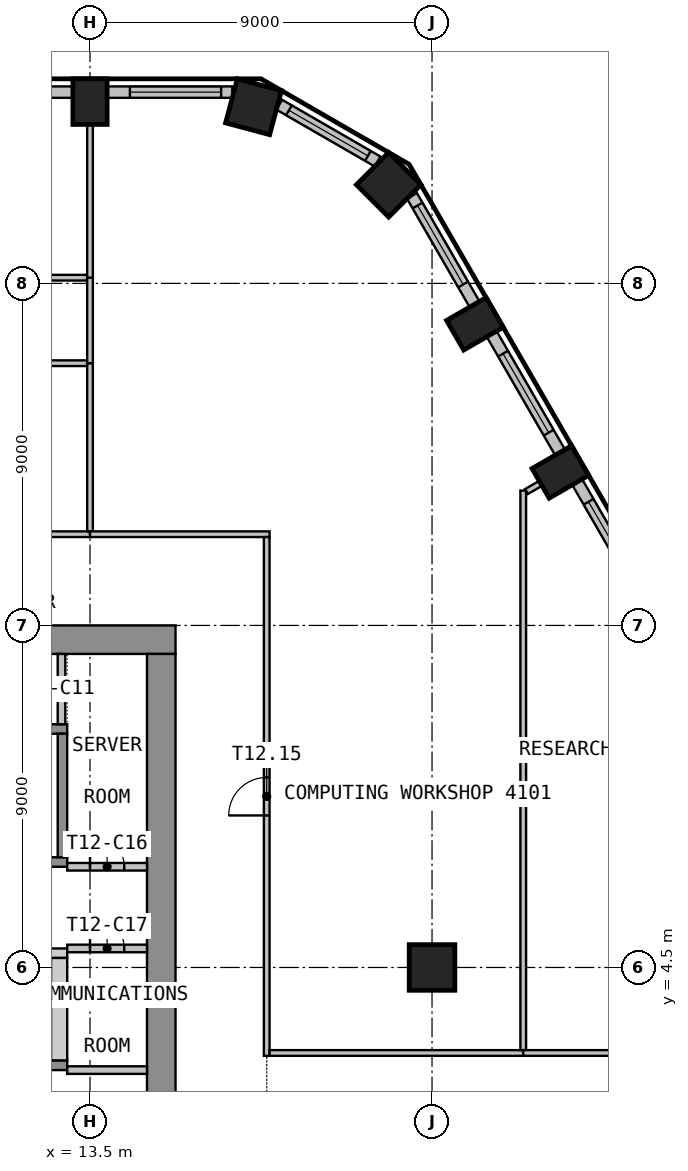
"""IFC4 building model, lengths in metres.
Left out: names, types, materials, properties, quantities, classifications, styles, units other than length and angle.
Written with IfcOpenShell. Run it as: python <this file> out.ifc"""

import sys

from ifc_helpers import new_model, si_unit, direction, frame, frame_2d, origin, origin_2d, place, context, subcontext, project, spatial, polyline, rectangle, circle, outline, extrude, element, fill, save


model = new_model("IFC4")
c1 = context("Model", 3, precision=1e-05, world=origin(), true_north=direction((0.0, 1.0)))
c2 = subcontext(c1, "Body", "Model", "MODEL_VIEW")
j1 = project(units=[si_unit("LENGTHUNIT", "METRE"), si_unit("PLANEANGLEUNIT", "RADIAN")], contexts=[c1])
p1 = place(None, origin())
s1 = spatial("IfcSite", under=j1, at=p1, CompositionType="ELEMENT")
p2 = place(p1, origin())
s2 = spatial("IfcBuilding", under=s1, at=p2, CompositionType="ELEMENT")
p3 = place(p2, frame((0.0, 0.0, 167.7)))
s3 = spatial("IfcBuildingStorey", under=s2, at=p3, CompositionType="ELEMENT", Elevation=167.7)
for number, where, z_axis, x_axis in (
    (1, (25.877, 17.539, 0.0), (0.0, 0.0, 1.0), (-0.5, 0.866, 0.0)),
    (2, (23.627, 21.436, 0.0), (0.0, 0.0, 1.0), (-0.5, 0.866, 0.0)),
):
    element("IfcColumn", number, at=place(p3, frame(where, z_axis=z_axis, x_axis=x_axis)), inside=s3, PredefinedType="COLUMN", context=c2, shape_type="SweptSolid", body=[
        extrude(rectangle(XDim=0.9, YDim=1.2, at=origin_2d()), origin(), (0.0, 0.0, 1.0), 3.575),
    ])
for number, where, z_axis, x_axis in (
    (3, (21.359, 25.095, 0.0), (0.0, 0.0, 1.0), (-0.707, 0.707, 0.0)),
    (4, (17.803, 27.148, 0.0), (0.0, 0.0, 1.0), (-0.966, 0.259, 0.0)),
):
    element("IfcColumn", number, at=place(p3, frame(where, z_axis=z_axis, x_axis=x_axis)), inside=s3, PredefinedType="COLUMN", context=c2, shape_type="SweptSolid", body=[
        extrude(rectangle(XDim=1.2, YDim=1.2, at=origin_2d()), origin(), (0.0, 0.0, 1.0), 3.575),
    ])
p4 = place(p3, frame((13.5, 27.283, 0.0), z_axis=(0.0, 0.0, 1.0), x_axis=(-1.0, 0.0, 0.0)))
e5 = element("IfcColumn", 5, at=p4, inside=s3, PredefinedType="COLUMN", context=c2, shape_type="SweptSolid", body=[
    extrude(rectangle(XDim=0.9, YDim=1.2, at=origin_2d()), origin(), (0.0, 0.0, 1.0), 3.575),
])
p5 = place(p3, frame((22.5, 4.5, 0.0), z_axis=(0.0, 0.0, 1.0), x_axis=(1.0, 0.0, 0.0)))
e6 = element("IfcColumn", 6, at=p5, inside=s3, PredefinedType="COLUMN", context=c2, shape_type="SweptSolid", body=[
    extrude(circle(Radius=0.6, at=origin_2d()), origin(), (0.0, 0.0, 1.0), 3.575),
])
p6 = place(p3, frame((28.119, 14.156, 0.0), z_axis=(0.0, 0.0, 1.0), x_axis=(-0.500027802648, 0.866009351323, 0.0)))
e7 = element("IfcWall", 7, at=p6, inside=s3, PredefinedType="SOLIDWALL", context=c2, shape_type="SweptSolid", body=[
    extrude(rectangle(XDim=3.599, YDim=0.3, at=frame_2d((1.799, 0.0))), origin(), (0.0, 0.0, 1.0), 3.575),
])
p7 = place(p6, frame((0.6, 0.0, 0.9)))
e8 = element("IfcOpeningElement", 8, at=p7, cuts=e7, PredefinedType="OPENING", context=c2, shape_type="SweptSolid", body=[
    extrude(rectangle(XDim=2.4, YDim=2.1, at=frame_2d((1.2, 1.05))), frame((0.0, 0.16, 0.0), z_axis=(0.0, -1.0, 0.0), x_axis=(1.0, 0.0, 0.0)), (0.0, 0.0, 1.0), 0.32),
])
p8 = place(p3, frame((25.869, 18.054, 0.0), z_axis=(0.0, 0.0, 1.0), x_axis=(-0.500027802648, 0.866009351323, 0.0)))
e9 = element("IfcWall", 9, at=p8, inside=s3, PredefinedType="SOLIDWALL", context=c2, shape_type="SweptSolid", body=[
    extrude(rectangle(XDim=3.599, YDim=0.3, at=frame_2d((1.799, 0.0))), origin(), (0.0, 0.0, 1.0), 3.575),
])
p9 = place(p8, frame((0.6, 0.0, 0.9)))
e10 = element("IfcOpeningElement", 10, at=p9, cuts=e9, PredefinedType="OPENING", context=c2, shape_type="SweptSolid", body=[
    extrude(rectangle(XDim=2.4, YDim=2.1, at=frame_2d((1.2, 1.05))), frame((0.0, 0.16, 0.0), z_axis=(0.0, -1.0, 0.0), x_axis=(1.0, 0.0, 0.0)), (0.0, 0.0, 1.0), 0.32),
])
p10 = place(p3, frame((23.619, 21.951, 0.0), z_axis=(0.0, 0.0, 1.0), x_axis=(-0.500036802197, 0.866004154983, 0.0)))
e11 = element("IfcWall", 11, at=p10, inside=s3, PredefinedType="SOLIDWALL", context=c2, shape_type="SweptSolid", body=[
    extrude(rectangle(XDim=3.294, YDim=0.3, at=frame_2d((1.647, 0.0))), origin(), (0.0, 0.0, 1.0), 3.575),
])
p11 = place(p10, frame((0.6, 0.0, 0.9)))
e12 = element("IfcOpeningElement", 12, at=p11, cuts=e11, PredefinedType="OPENING", context=c2, shape_type="SweptSolid", body=[
    extrude(rectangle(XDim=2.4, YDim=2.1, at=frame_2d((1.2, 1.05))), frame((0.0, 0.16, 0.0), z_axis=(0.0, -1.0, 0.0), x_axis=(1.0, 0.0, 0.0)), (0.0, 0.0, 1.0), 0.32),
])
p12 = place(p3, frame((21.068, 25.707, 0.0), z_axis=(0.0, 0.0, 1.0), x_axis=(-0.866012844897, 0.500021752, 0.0)))
e13 = element("IfcWall", 13, at=p12, inside=s3, PredefinedType="SOLIDWALL", context=c2, shape_type="SweptSolid", body=[
    extrude(rectangle(XDim=2.989, YDim=0.3, at=frame_2d((1.495, 0.0))), origin(), (0.0, 0.0, 1.0), 3.575),
])
p13 = place(p12, frame((0.295, 0.0, 0.9)))
e14 = element("IfcOpeningElement", 14, at=p13, cuts=e13, PredefinedType="OPENING", context=c2, shape_type="SweptSolid", body=[
    extrude(rectangle(XDim=2.4, YDim=2.1, at=frame_2d((1.2, 1.05))), frame((0.0, 0.16, 0.0), z_axis=(0.0, -1.0, 0.0), x_axis=(1.0, 0.0, 0.0)), (0.0, 0.0, 1.0), 0.32),
])
p14 = place(p3, frame((17.245, 27.533, 0.0), z_axis=(0.0, 0.0, 1.0), x_axis=(-1.0, 0.0, 0.0)))
e15 = element("IfcWall", 15, at=p14, inside=s3, PredefinedType="SOLIDWALL", context=c2, shape_type="SweptSolid", body=[
    extrude(rectangle(XDim=3.294, YDim=0.3, at=frame_2d((1.647, 0.0))), origin(), (0.0, 0.0, 1.0), 3.575),
])
p15 = place(p14, frame((0.295, 0.0, 0.9)))
e16 = element("IfcOpeningElement", 16, at=p15, cuts=e15, PredefinedType="OPENING", context=c2, shape_type="SweptSolid", body=[
    extrude(rectangle(XDim=2.4, YDim=2.1, at=frame_2d((1.2, 1.05))), frame((0.0, 0.16, 0.0), z_axis=(0.0, -1.0, 0.0), x_axis=(1.0, 0.0, 0.0)), (0.0, 0.0, 1.0), 0.32),
])
p16 = place(p3, frame((13.05, 27.533, 0.0), z_axis=(0.0, 0.0, 1.0), x_axis=(-1.0, 0.0, 0.0)))
e17 = element("IfcWall", 17, at=p16, inside=s3, PredefinedType="SOLIDWALL", context=c2, shape_type="SweptSolid", body=[
    extrude(rectangle(XDim=3.599, YDim=0.3, at=frame_2d((1.8, 0.0))), origin(), (0.0, 0.0, 1.0), 3.575),
])
p17 = place(p16, frame((0.6, 0.0, 0.9)))
e18 = element("IfcOpeningElement", 18, at=p17, cuts=e17, PredefinedType="OPENING", context=c2, shape_type="SweptSolid", body=[
    extrude(rectangle(XDim=2.4, YDim=2.1, at=frame_2d((1.2, 1.05))), frame((0.0, 0.16, 0.0), z_axis=(0.0, -1.0, 0.0), x_axis=(1.0, 0.0, 0.0)), (0.0, 0.0, 1.0), 0.32),
])
p18 = place(p3, frame((-15.75, 13.125, 0.0), z_axis=(0.0, 0.0, 1.0), x_axis=(1.0, 0.0, 0.0)))
e19 = element("IfcWall", 19, at=p18, inside=s3, PredefinedType="SHEAR", context=c2, shape_type="SweptSolid", body=[
    extrude(rectangle(XDim=31.5, YDim=0.75, at=frame_2d((15.75, 0.0))), origin(), (0.0, 0.0, 1.0), 3.575),
])
p19 = place(p18, frame((14.55, 0.0, 0.0)))
e20 = element("IfcOpeningElement", 20, at=p19, cuts=e19, PredefinedType="OPENING", context=c2, shape_type="SweptSolid", body=[
    extrude(rectangle(XDim=2.4, YDim=2.1, at=frame_2d((1.2, 1.05))), frame((0.0, 0.385, 0.0), z_axis=(0.0, -1.0, 0.0), x_axis=(1.0, 0.0, 0.0)), (0.0, 0.0, 1.0), 0.77),
])
p20 = place(p18, frame((3.3, 0.0, 0.0)))
e21 = element("IfcOpeningElement", 21, at=p20, cuts=e19, PredefinedType="OPENING", context=c2, shape_type="SweptSolid", body=[
    extrude(rectangle(XDim=1.2, YDim=2.1, at=frame_2d((0.6, 1.05))), frame((0.0, 0.385, 0.0), z_axis=(0.0, -1.0, 0.0), x_axis=(1.0, 0.0, 0.0)), (0.0, 0.0, 1.0), 0.77),
])
p21 = place(p18, frame((27.0, 0.0, 0.0)))
e22 = element("IfcOpeningElement", 22, at=p21, cuts=e19, PredefinedType="OPENING", context=c2, shape_type="SweptSolid", body=[
    extrude(rectangle(XDim=1.2, YDim=2.1, at=frame_2d((0.6, 1.05))), frame((0.0, 0.385, 0.0), z_axis=(0.0, -1.0, 0.0), x_axis=(1.0, 0.0, 0.0)), (0.0, 0.0, 1.0), 0.77),
])
p22 = place(p3, frame((15.375, -12.75, 0.0), z_axis=(0.0, 0.0, 1.0), x_axis=(0.0, 1.0, 0.0)))
e23 = element("IfcWall", 23, at=p22, inside=s3, PredefinedType="SHEAR", context=c2, shape_type="SweptSolid", body=[
    extrude(rectangle(XDim=25.5, YDim=0.75, at=frame_2d((12.75, 0.0))), origin(), (0.0, 0.0, 1.0), 3.575),
])
p23 = place(p22, frame((11.55, 0.0, 0.0)))
e24 = element("IfcOpeningElement", 24, at=p23, cuts=e23, PredefinedType="OPENING", context=c2, shape_type="SweptSolid", body=[
    extrude(rectangle(XDim=2.4, YDim=2.1, at=frame_2d((1.2, 1.05))), frame((0.0, 0.385, 0.0), z_axis=(0.0, -1.0, 0.0), x_axis=(1.0, 0.0, 0.0)), (0.0, 0.0, 1.0), 0.77),
])
p24 = place(p3, origin())
e25 = element("IfcWall", 25, at=p24, inside=s3, PredefinedType="SHEAR", context=c2, shape_type="SweptSolid", body=[
    extrude(outline(polyline([(4.075, 4.75), (12.9, 4.75), (12.9, 5.0), (4.075, 5.0), (4.075, 4.75)])), origin(), (0.0, 0.0, 1.0), 3.575),
])
p25 = place(p3, origin())
e26 = element("IfcWall", 26, at=p25, inside=s3, PredefinedType="SHEAR", context=c2, shape_type="SweptSolid", body=[
    extrude(outline(polyline([(12.475, 2.05), (12.9, 2.05), (12.9, 4.75), (12.475, 4.75), (12.475, 2.05)])), origin(), (0.0, 0.0, 1.0), 3.575),
])
p26 = place(p3, frame((9.675, 1.925, 0.0), z_axis=(0.0, 0.0, 1.0), x_axis=(1.0, 0.0, 0.0)))
e27 = element("IfcWall", 27, at=p26, inside=s3, PredefinedType="SHEAR", context=c2, shape_type="SweptSolid", body=[
    extrude(rectangle(XDim=3.225, YDim=0.25, at=frame_2d((1.612, 0.0))), origin(), (0.0, 0.0, 1.0), 3.575),
])
p27 = place(p26, frame((0.925, 0.0, 0.0)))
e28 = element("IfcOpeningElement", 28, at=p27, cuts=e27, PredefinedType="OPENING", context=c2, shape_type="SweptSolid", body=[
    extrude(rectangle(XDim=1.2, YDim=2.1, at=frame_2d((0.6, 1.05))), frame((0.0, 0.135, 0.0), z_axis=(0.0, -1.0, 0.0), x_axis=(1.0, 0.0, 0.0)), (0.0, 0.0, 1.0), 0.27),
])
p28 = place(p3, frame((2.8, 7.275, 0.0), z_axis=(0.0, 0.0, 1.0), x_axis=(1.0, 0.0, 0.0)))
e29 = element("IfcWall", 29, at=p28, inside=s3, PredefinedType="SHEAR", context=c2, shape_type="SweptSolid", body=[
    extrude(rectangle(XDim=10.1, YDim=0.25, at=frame_2d((5.05, 0.0))), origin(), (0.0, 0.0, 1.0), 3.575),
])
p29 = place(p28, frame((8.45, 0.0, 0.0)))
e30 = element("IfcOpeningElement", 30, at=p29, cuts=e29, PredefinedType="OPENING", context=c2, shape_type="SweptSolid", body=[
    extrude(rectangle(XDim=1.2, YDim=2.1, at=frame_2d((0.6, 1.05))), frame((0.0, 0.135, 0.0), z_axis=(0.0, -1.0, 0.0), x_axis=(1.0, 0.0, 0.0)), (0.0, 0.0, 1.0), 0.27),
])
p30 = place(p3, frame((2.8, 10.775, 0.0), z_axis=(0.0, 0.0, 1.0), x_axis=(1.0, 0.0, 0.0)))
e31 = element("IfcWall", 31, at=p30, inside=s3, PredefinedType="SHEAR", context=c2, shape_type="SweptSolid", body=[
    extrude(rectangle(XDim=10.1, YDim=0.25, at=frame_2d((5.05, 0.0))), origin(), (0.0, 0.0, 1.0), 3.575),
])
p31 = place(p30, frame((8.45, 0.0, 0.0)))
e32 = element("IfcOpeningElement", 32, at=p31, cuts=e31, PredefinedType="OPENING", context=c2, shape_type="SweptSolid", body=[
    extrude(rectangle(XDim=1.2, YDim=2.1, at=frame_2d((0.6, 1.05))), frame((0.0, 0.135, 0.0), z_axis=(0.0, -1.0, 0.0), x_axis=(1.0, 0.0, 0.0)), (0.0, 0.0, 1.0), 0.27),
])
p32 = place(p3, frame((12.775, 7.4, 0.0), z_axis=(0.0, 0.0, 1.0), x_axis=(0.0, 1.0, 0.0)))
e33 = element("IfcWall", 33, at=p32, inside=s3, PredefinedType="SHEAR", context=c2, shape_type="SweptSolid", body=[
    extrude(rectangle(XDim=3.25, YDim=0.25, at=frame_2d((1.625, 0.0))), origin(), (0.0, 0.0, 1.0), 3.575),
])
p33 = place(p3, frame((12.75, 10.9, 0.0), z_axis=(0.0, 0.0, 1.0), x_axis=(0.0, 1.0, 0.0)))
e34 = element("IfcWall", 34, at=p33, inside=s3, PredefinedType="PARTITIONING", context=c2, shape_type="SweptSolid", body=[
    extrude(rectangle(XDim=1.85, YDim=0.2, at=frame_2d((0.925, 0.0))), origin(), (0.0, 0.0, 1.0), 3.575),
])
p34 = place(p3, frame((12.9, 7.15, 0.0), z_axis=(0.0, 0.0, 1.0), x_axis=(1.0, 0.0, 0.0)))
e35 = element("IfcWall", 35, at=p34, inside=s3, PredefinedType="PARTITIONING", context=c2, shape_type="SweptSolid", body=[
    extrude(rectangle(XDim=2.1, YDim=0.2, at=frame_2d((1.05, 0.0))), origin(), (0.0, 0.0, 1.0), 3.575),
])
p35 = place(p34, frame((0.6, 0.0, 0.0)))
e36 = element("IfcOpeningElement", 36, at=p35, cuts=e35, PredefinedType="OPENING", context=c2, shape_type="SweptSolid", body=[
    extrude(rectangle(XDim=0.9, YDim=2.1, at=frame_2d((0.45, 1.05))), frame((0.0, 0.11, 0.0), z_axis=(0.0, -1.0, 0.0), x_axis=(1.0, 0.0, 0.0)), (0.0, 0.0, 1.0), 0.22),
])
p36 = place(p3, frame((12.9, 5.0, 0.0), z_axis=(0.0, 0.0, 1.0), x_axis=(1.0, 0.0, 0.0)))
e37 = element("IfcWall", 37, at=p36, inside=s3, PredefinedType="PARTITIONING", context=c2, shape_type="SweptSolid", body=[
    extrude(rectangle(XDim=2.1, YDim=0.2, at=frame_2d((1.05, 0.0))), origin(), (0.0, 0.0, 1.0), 3.575),
])
p37 = place(p36, frame((0.6, 0.0, 0.0)))
e38 = element("IfcOpeningElement", 38, at=p37, cuts=e37, PredefinedType="OPENING", context=c2, shape_type="SweptSolid", body=[
    extrude(rectangle(XDim=0.9, YDim=2.1, at=frame_2d((0.45, 1.05))), frame((0.0, 0.11, 0.0), z_axis=(0.0, -1.0, 0.0), x_axis=(1.0, 0.0, 0.0)), (0.0, 0.0, 1.0), 0.22),
])
p38 = place(p3, frame((12.9, 1.8, 0.0), z_axis=(0.0, 0.0, 1.0), x_axis=(1.0, 0.0, 0.0)))
e39 = element("IfcWall", 39, at=p38, inside=s3, PredefinedType="PARTITIONING", context=c2, shape_type="SweptSolid", body=[
    extrude(rectangle(XDim=2.1, YDim=0.2, at=frame_2d((1.05, 0.0))), origin(), (0.0, 0.0, 1.0), 3.575),
])
p39 = place(p3, frame((13.5, 15.9, 0.0), z_axis=(0.0, 0.0, 1.0), x_axis=(-1.0, 0.0, 0.0)))
e40 = element("IfcWall", 40, at=p39, inside=s3, PredefinedType="PARTITIONING", context=c2, shape_type="SweptSolid", body=[
    extrude(rectangle(XDim=8.925, YDim=0.15, at=frame_2d((4.462, 0.0))), origin(), (0.0, 0.0, 1.0), 3.575),
])
p40 = place(p39, frame((3.962, 0.0, 0.0)))
e41 = element("IfcOpeningElement", 41, at=p40, cuts=e40, PredefinedType="OPENING", context=c2, shape_type="SweptSolid", body=[
    extrude(rectangle(XDim=1.0, YDim=2.1, at=frame_2d((0.5, 1.05))), frame((0.0, 0.085, 0.0), z_axis=(0.0, -1.0, 0.0), x_axis=(1.0, 0.0, 0.0)), (0.0, 0.0, 1.0), 0.17),
])
for number, where, z_axis, x_axis in (
    (42, (4.575, 20.4, 0.0), (0.0, 0.0, 1.0), (1.0, 0.0, 0.0)),
    (43, (4.575, 22.65, 0.0), (0.0, 0.0, 1.0), (1.0, 0.0, 0.0)),
):
    element("IfcWall", number, at=place(p3, frame(where, z_axis=z_axis, x_axis=x_axis)), inside=s3, PredefinedType="PARTITIONING", context=c2, shape_type="SweptSolid", body=[
        extrude(rectangle(XDim=8.85, YDim=0.15, at=frame_2d((4.425, 0.0))), origin(), (0.0, 0.0, 1.0), 3.575),
    ])
p41 = place(p3, frame((13.5, 20.4, 0.0), z_axis=(0.0, 0.0, 1.0), x_axis=(0.0, -1.0, 0.0)))
e44 = element("IfcWall", 44, at=p41, inside=s3, PredefinedType="PARTITIONING", context=c2, shape_type="SweptSolid", body=[
    extrude(rectangle(XDim=4.425, YDim=0.15, at=frame_2d((2.212, 0.0))), origin(), (0.0, 0.0, 1.0), 3.575),
])
p42 = place(p3, frame((18.225, 15.9, 0.0), z_axis=(0.0, 0.0, 1.0), x_axis=(-1.0, 0.0, 0.0)))
e45 = element("IfcWall", 45, at=p42, inside=s3, PredefinedType="PARTITIONING", context=c2, shape_type="SweptSolid", body=[
    extrude(rectangle(XDim=4.725, YDim=0.15, at=frame_2d((2.363, 0.0))), origin(), (0.0, 0.0, 1.0), 3.575),
])
p43 = place(p3, frame((13.5, 22.65, 0.0), z_axis=(0.0, 0.0, 1.0), x_axis=(0.0, -1.0, 0.0)))
e46 = element("IfcWall", 46, at=p43, inside=s3, PredefinedType="PARTITIONING", context=c2, shape_type="SweptSolid", body=[
    extrude(rectangle(XDim=2.25, YDim=0.15, at=frame_2d((1.125, 0.0))), origin(), (0.0, 0.0, 1.0), 3.575),
])
p44 = place(p3, frame((13.5, 26.663, 0.0), z_axis=(0.0, 0.0, 1.0), x_axis=(0.0, -1.0, 0.0)))
e47 = element("IfcWall", 47, at=p44, inside=s3, PredefinedType="PARTITIONING", context=c2, shape_type="SweptSolid", body=[
    extrude(rectangle(XDim=4.013, YDim=0.15, at=frame_2d((2.006, 0.0))), origin(), (0.0, 0.0, 1.0), 3.575),
])
p45 = place(p3, frame((18.15, 2.175, 0.0), z_axis=(0.0, 0.0, 1.0), x_axis=(0.0, 1.0, 0.0)))
e48 = element("IfcWall", 48, at=p45, inside=s3, PredefinedType="PARTITIONING", context=c2, shape_type="SweptSolid", body=[
    extrude(rectangle(XDim=13.65, YDim=0.15, at=frame_2d((6.825, 0.0))), origin(), (0.0, 0.0, 1.0), 3.575),
])
p46 = place(p45, frame((6.325, 0.0, 0.0)))
e49 = element("IfcOpeningElement", 49, at=p46, cuts=e48, PredefinedType="OPENING", context=c2, shape_type="SweptSolid", body=[
    extrude(rectangle(XDim=1.0, YDim=2.1, at=frame_2d((0.5, 1.05))), frame((0.0, 0.085, 0.0), z_axis=(0.0, -1.0, 0.0), x_axis=(1.0, 0.0, 0.0)), (0.0, 0.0, 1.0), 0.17),
])
p47 = place(p3, frame((18.225, 2.25, 0.0), z_axis=(0.0, 0.0, 1.0), x_axis=(1.0, 0.0, 0.0)))
e50 = element("IfcWall", 50, at=p47, inside=s3, PredefinedType="PARTITIONING", context=c2, shape_type="SweptSolid", body=[
    extrude(rectangle(XDim=6.675, YDim=0.15, at=frame_2d((3.337, 0.0))), origin(), (0.0, 0.0, 1.0), 3.575),
])
p48 = place(p3, frame((24.9, 17.049, 0.0), z_axis=(0.0, 0.0, 1.0), x_axis=(0.0, -1.0, 0.0)))
e51 = element("IfcWall", 51, at=p48, inside=s3, PredefinedType="PARTITIONING", context=c2, shape_type="SweptSolid", body=[
    extrude(rectangle(XDim=14.724, YDim=0.15, at=frame_2d((7.362, 0.0))), origin(), (0.0, 0.0, 1.0), 3.575),
])
p49 = place(p3, frame((24.9, 2.25, 0.0), z_axis=(0.0, 0.0, 1.0), x_axis=(1.0, 0.0, 0.0)))
e52 = element("IfcWall", 52, at=p49, inside=s3, PredefinedType="PARTITIONING", context=c2, shape_type="SweptSolid", body=[
    extrude(rectangle(XDim=9.068, YDim=0.15, at=frame_2d((4.534, 0.0))), origin(), (0.0, 0.0, 1.0), 3.575),
])
p50 = place(p49, frame((4.034, 0.0, 0.0)))
e53 = element("IfcOpeningElement", 53, at=p50, cuts=e52, PredefinedType="OPENING", context=c2, shape_type="SweptSolid", body=[
    extrude(rectangle(XDim=1.0, YDim=2.1, at=frame_2d((0.5, 1.05))), frame((0.0, 0.085, 0.0), z_axis=(0.0, -1.0, 0.0), x_axis=(1.0, 0.0, 0.0)), (0.0, 0.0, 1.0), 0.17),
])
p51 = place(p3, frame((25.341, 17.228, 0.0), z_axis=(0.0, 0.0, 1.0), x_axis=(-0.866066236526, -0.499929268946, 0.0)))
e54 = element("IfcWall", 54, at=p51, inside=s3, PredefinedType="PARTITIONING", context=c2, shape_type="SweptSolid", body=[
    extrude(rectangle(XDim=0.409, YDim=0.15, at=frame_2d((0.204, 0.0))), origin(), (0.0, 0.0, 1.0), 3.575),
])
p52 = place(p7, origin())
e55 = element("IfcWindow", 55, at=p52, inside=s3, PartitioningType="SINGLE_PANEL", PredefinedType="WINDOW", context=c2, shape_type="SweptSolid", body=[
    extrude(rectangle(XDim=2.4, YDim=2.1, at=frame_2d((1.2, 1.05))), frame((0.0, 0.03, 0.0), z_axis=(0.0, -1.0, 0.0), x_axis=(1.0, 0.0, 0.0)), (0.0, 0.0, 1.0), 0.06),
])
fill(e8, e55)
p53 = place(p9, origin())
e56 = element("IfcWindow", 56, at=p53, inside=s3, PartitioningType="SINGLE_PANEL", PredefinedType="WINDOW", context=c2, shape_type="SweptSolid", body=[
    extrude(rectangle(XDim=2.4, YDim=2.1, at=frame_2d((1.2, 1.05))), frame((0.0, 0.03, 0.0), z_axis=(0.0, -1.0, 0.0), x_axis=(1.0, 0.0, 0.0)), (0.0, 0.0, 1.0), 0.06),
])
fill(e10, e56)
p54 = place(p11, origin())
e57 = element("IfcWindow", 57, at=p54, inside=s3, PartitioningType="SINGLE_PANEL", PredefinedType="WINDOW", context=c2, shape_type="SweptSolid", body=[
    extrude(rectangle(XDim=2.4, YDim=2.1, at=frame_2d((1.2, 1.05))), frame((0.0, 0.03, 0.0), z_axis=(0.0, -1.0, 0.0), x_axis=(1.0, 0.0, 0.0)), (0.0, 0.0, 1.0), 0.06),
])
fill(e12, e57)
p55 = place(p13, origin())
e58 = element("IfcWindow", 58, at=p55, inside=s3, PartitioningType="SINGLE_PANEL", PredefinedType="WINDOW", context=c2, shape_type="SweptSolid", body=[
    extrude(rectangle(XDim=2.4, YDim=2.1, at=frame_2d((1.2, 1.05))), frame((0.0, 0.03, 0.0), z_axis=(0.0, -1.0, 0.0), x_axis=(1.0, 0.0, 0.0)), (0.0, 0.0, 1.0), 0.06),
])
fill(e14, e58)
p56 = place(p15, origin())
e59 = element("IfcWindow", 59, at=p56, inside=s3, PartitioningType="SINGLE_PANEL", PredefinedType="WINDOW", context=c2, shape_type="SweptSolid", body=[
    extrude(rectangle(XDim=2.4, YDim=2.1, at=frame_2d((1.2, 1.05))), frame((0.0, 0.03, 0.0), z_axis=(0.0, -1.0, 0.0), x_axis=(1.0, 0.0, 0.0)), (0.0, 0.0, 1.0), 0.06),
])
fill(e16, e59)
p57 = place(p35, origin())
e60 = element("IfcDoor", 60, at=p57, inside=s3, OperationType="SINGLE_SWING_LEFT", PredefinedType="DOOR", context=c2, shape_type="SweptSolid", body=[
    extrude(rectangle(XDim=0.9, YDim=2.1, at=frame_2d((0.45, 1.05))), frame((0.0, 0.025, 0.0), z_axis=(0.0, -1.0, 0.0), x_axis=(1.0, 0.0, 0.0)), (0.0, 0.0, 1.0), 0.05),
])
fill(e36, e60)
p58 = place(p37, origin())
e61 = element("IfcDoor", 61, at=p58, inside=s3, OperationType="SINGLE_SWING_LEFT", PredefinedType="DOOR", context=c2, shape_type="SweptSolid", body=[
    extrude(rectangle(XDim=0.9, YDim=2.1, at=frame_2d((0.45, 1.05))), frame((0.0, 0.025, 0.0), z_axis=(0.0, -1.0, 0.0), x_axis=(1.0, 0.0, 0.0)), (0.0, 0.0, 1.0), 0.05),
])
fill(e38, e61)
p59 = place(p46, origin())
e62 = element("IfcDoor", 62, at=p59, inside=s3, OperationType="SINGLE_SWING_RIGHT", PredefinedType="DOOR", context=c2, shape_type="SweptSolid", body=[
    extrude(rectangle(XDim=1.0, YDim=2.1, at=frame_2d((0.5, 1.05))), frame((0.0, 0.025, 0.0), z_axis=(0.0, -1.0, 0.0), x_axis=(1.0, 0.0, 0.0)), (0.0, 0.0, 1.0), 0.05),
])
fill(e49, e62)
save(model, sys.argv[1])
